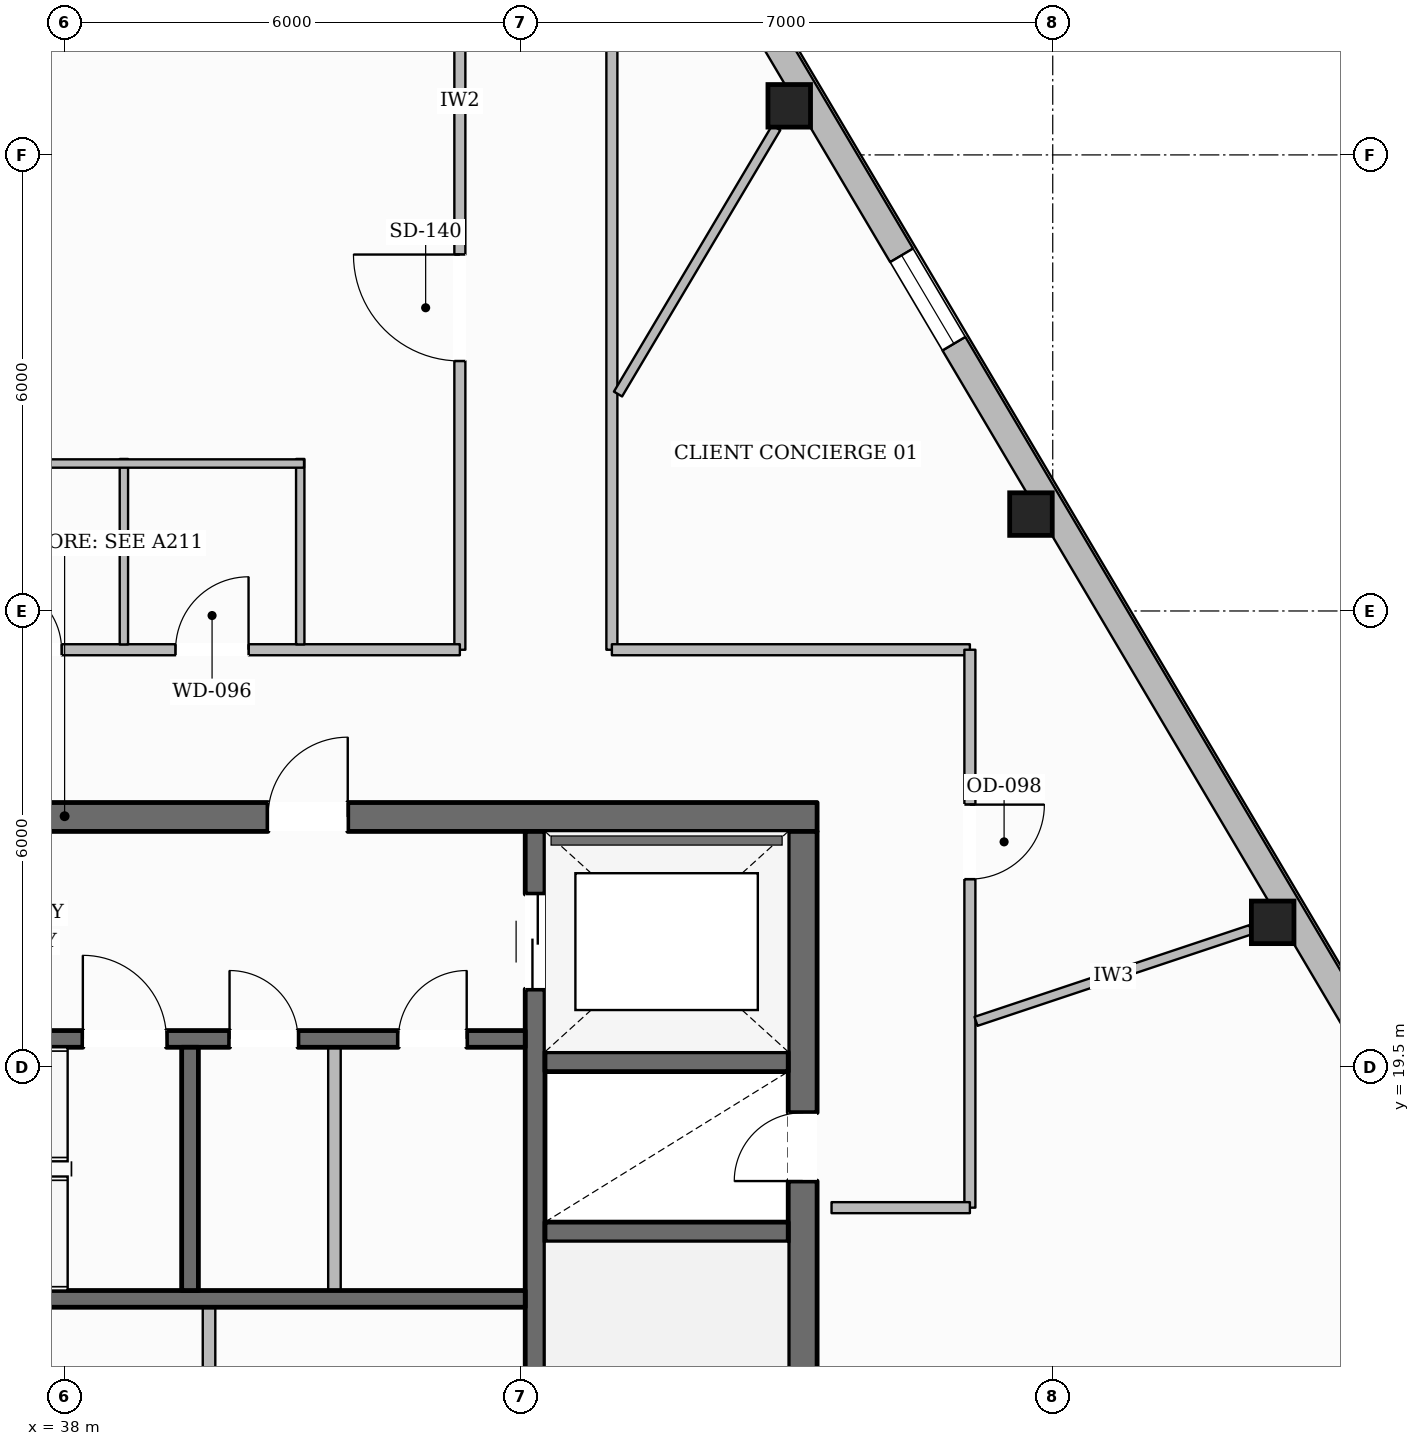
"""IFC4 building model, lengths in metres.
Left out: names, types, materials, properties, quantities, classifications, styles, units other than length and angle.
Written with IfcOpenShell. Run it as: python <this file> out.ifc"""

import sys

from ifc_helpers import new_model, si_unit, direction, frame, frame_2d, origin, origin_2d, place, context, subcontext, project, spatial, rectangle, hollow_rectangle, extrude, element, fill, save


model = new_model("IFC4")
c1 = context("Model", 3, precision=1e-05, world=origin(), true_north=direction((0.0, 1.0)))
c2 = subcontext(c1, "Body", "Model", "MODEL_VIEW")
j1 = project(units=[si_unit("LENGTHUNIT", "METRE"), si_unit("PLANEANGLEUNIT", "RADIAN")], contexts=[c1])
p1 = place(None, origin())
s1 = spatial("IfcSite", under=j1, at=p1, CompositionType="ELEMENT")
p2 = place(p1, origin())
s2 = spatial("IfcBuilding", under=s1, at=p2, CompositionType="ELEMENT")
p3 = place(p2, frame((0.0, 0.0, 266.45)))
s3 = spatial("IfcBuildingStorey", under=s2, at=p3, CompositionType="ELEMENT", Elevation=266.45)
p4 = place(p3, frame((28.1, 22.79, 0.0), z_axis=(0.0, 0.0, 1.0), x_axis=(1.0, 0.0, 0.0)))
e1 = element("IfcWall", 1, at=p4, inside=s3, PredefinedType="SOLIDWALL", context=c2, shape_type="SweptSolid", body=[
    extrude(rectangle(XDim=19.8, YDim=0.38, at=frame_2d((9.9, 0.0))), origin(), (0.0, 0.0, 1.0), 3.61),
])
p5 = place(p4, frame((6.175, 0.0, 0.0)))
e2 = element("IfcOpeningElement", 2, at=p5, cuts=e1, PredefinedType="OPENING", context=c2, shape_type="SweptSolid", body=[
    extrude(rectangle(XDim=1.05, YDim=2.15, at=frame_2d((0.525, 1.075))), frame((0.0, 0.2, 0.0), z_axis=(0.0, -1.0, 0.0), x_axis=(1.0, 0.0, 0.0)), (0.0, 0.0, 1.0), 0.4),
])
p6 = place(p4, frame((12.575, 0.0, 0.0)))
e3 = element("IfcOpeningElement", 3, at=p6, cuts=e1, PredefinedType="OPENING", context=c2, shape_type="SweptSolid", body=[
    extrude(rectangle(XDim=1.05, YDim=2.15, at=frame_2d((0.525, 1.075))), frame((0.0, 0.2, 0.0), z_axis=(0.0, -1.0, 0.0), x_axis=(1.0, 0.0, 0.0)), (0.0, 0.0, 1.0), 0.4),
])
p7 = place(p3, frame((47.71, 9.6, 0.0), z_axis=(0.0, 0.0, 1.0), x_axis=(0.0, 1.0, 0.0)))
e4 = element("IfcWall", 4, at=p7, inside=s3, PredefinedType="SOLIDWALL", context=c2, shape_type="SweptSolid", body=[
    extrude(rectangle(XDim=13.0, YDim=0.38, at=frame_2d((6.5, 0.0))), origin(), (0.0, 0.0, 1.0), 3.61),
])
p8 = place(p7, frame((0.2, 0.0, 0.0)))
e5 = element("IfcOpeningElement", 5, at=p8, cuts=e4, PredefinedType="OPENING", context=c2, shape_type="SweptSolid", body=[
    extrude(rectangle(XDim=1.1, YDim=2.15, at=frame_2d((0.55, 1.075))), frame((0.0, 0.2, 0.0), z_axis=(0.0, -1.0, 0.0), x_axis=(1.0, 0.0, 0.0)), (0.0, 0.0, 1.0), 0.4),
])
p9 = place(p7, frame((8.4, 0.0, 0.0)))
e6 = element("IfcOpeningElement", 6, at=p9, cuts=e4, PredefinedType="OPENING", context=c2, shape_type="SweptSolid", body=[
    extrude(rectangle(XDim=0.9, YDim=2.1, at=frame_2d((0.45, 1.05))), frame((0.0, 0.2, 0.0), z_axis=(0.0, -1.0, 0.0), x_axis=(1.0, 0.0, 0.0)), (0.0, 0.0, 1.0), 0.4),
])
p10 = place(p3, frame((44.19, 9.6, 0.0), z_axis=(0.0, 0.0, 1.0), x_axis=(0.0, 1.0, 0.0)))
e7 = element("IfcWall", 7, at=p10, inside=s3, PredefinedType="SHEAR", context=c2, shape_type="SweptSolid", body=[
    extrude(rectangle(XDim=13.0, YDim=0.26, at=frame_2d((6.5, 0.0))), origin(), (0.0, 0.0, 1.0), 3.61),
])
p11 = place(p10, frame((10.925, 0.0, 0.0)))
e8 = element("IfcOpeningElement", 8, at=p11, cuts=e7, PredefinedType="OPENING", context=c2, shape_type="SweptSolid", body=[
    extrude(rectangle(XDim=1.25, YDim=2.25, at=frame_2d((0.625, 1.125))), frame((0.0, 0.14, 0.0), z_axis=(0.0, -1.0, 0.0), x_axis=(1.0, 0.0, 0.0)), (0.0, 0.0, 1.0), 0.28),
])
for number, where, z_axis, x_axis in (
    (9, (44.32, 17.33, 0.0), (0.0, 0.0, 1.0), (1.0, 0.0, 0.0)),
    (10, (44.32, 19.57, 0.0), (0.0, 0.0, 1.0), (1.0, 0.0, 0.0)),
):
    element("IfcWall", number, at=place(p3, frame(where, z_axis=z_axis, x_axis=x_axis)), inside=s3, PredefinedType="SHEAR", context=c2, shape_type="SweptSolid", body=[
        extrude(rectangle(XDim=3.2, YDim=0.26, at=frame_2d((1.6, 0.0))), origin(), (0.0, 0.0, 1.0), 3.61),
    ])
p12 = place(p3, frame((31.94, 19.87, 0.0), z_axis=(0.0, 0.0, 1.0), x_axis=(1.0, 0.0, 0.0)))
e11 = element("IfcWall", 11, at=p12, inside=s3, PredefinedType="SOLIDWALL", context=c2, shape_type="SweptSolid", body=[
    extrude(rectangle(XDim=12.12, YDim=0.22, at=frame_2d((6.06, 0.0))), origin(), (0.0, 0.0, 1.0), 3.61),
])
p13 = place(p12, frame((6.3, 0.0, 0.0)))
e12 = element("IfcOpeningElement", 12, at=p13, cuts=e11, PredefinedType="OPENING", context=c2, shape_type="SweptSolid", body=[
    extrude(rectangle(XDim=1.1, YDim=2.15, at=frame_2d((0.55, 1.075))), frame((0.0, 0.12, 0.0), z_axis=(0.0, -1.0, 0.0), x_axis=(1.0, 0.0, 0.0)), (0.0, 0.0, 1.0), 0.24),
])
p14 = place(p12, frame((8.23, 0.0, 0.0)))
e13 = element("IfcOpeningElement", 13, at=p14, cuts=e11, PredefinedType="OPENING", context=c2, shape_type="SweptSolid", body=[
    extrude(rectangle(XDim=0.9, YDim=2.1, at=frame_2d((0.45, 1.05))), frame((0.0, 0.12, 0.0), z_axis=(0.0, -1.0, 0.0), x_axis=(1.0, 0.0, 0.0)), (0.0, 0.0, 1.0), 0.24),
])
p15 = place(p12, frame((10.45, 0.0, 0.0)))
e14 = element("IfcOpeningElement", 14, at=p15, cuts=e11, PredefinedType="OPENING", context=c2, shape_type="SweptSolid", body=[
    extrude(rectangle(XDim=0.9, YDim=2.1, at=frame_2d((0.45, 1.05))), frame((0.0, 0.12, 0.0), z_axis=(0.0, -1.0, 0.0), x_axis=(1.0, 0.0, 0.0)), (0.0, 0.0, 1.0), 0.24),
])
p16 = place(p3, frame((31.94, 16.45, 0.0), z_axis=(0.0, 0.0, 1.0), x_axis=(1.0, 0.0, 0.0)))
e15 = element("IfcWall", 15, at=p16, inside=s3, PredefinedType="SOLIDWALL", context=c2, shape_type="SweptSolid", body=[
    extrude(rectangle(XDim=12.12, YDim=0.22, at=frame_2d((6.06, 0.0))), origin(), (0.0, 0.0, 1.0), 3.61),
])
p17 = place(p3, frame((39.65, 16.56, 0.0), z_axis=(0.0, 0.0, 1.0), x_axis=(0.0, 1.0, 0.0)))
e16 = element("IfcWall", 16, at=p17, inside=s3, PredefinedType="SOLIDWALL", context=c2, shape_type="SweptSolid", body=[
    extrude(rectangle(XDim=3.2, YDim=0.22, at=frame_2d((1.6, 0.0))), origin(), (0.0, 0.0, 1.0), 3.61),
])
for number, where, z_axis, x_axis in (
    (17, (53.894, 21.404, 0.0), (0.0, 0.0, 1.0), (1.0, 0.0, 0.0)),
    (18, (50.713, 26.775, 0.0), (0.0, 0.0, 1.0), (1.0, 0.0, 0.0)),
    (19, (47.533, 32.146, 0.0), (0.0, 0.0, 1.0), (1.0, 0.0, 0.0)),
):
    element("IfcColumn", number, at=place(p3, frame(where, z_axis=z_axis, x_axis=x_axis)), inside=s3, PredefinedType="COLUMN", context=c2, shape_type="SweptSolid", body=[
        extrude(hollow_rectangle(XDim=0.56, YDim=0.56, WallThickness=0.025, at=origin_2d()), origin(), (0.0, 0.0, 1.0), 3.61),
    ])
p18 = place(p3, frame((41.166, 43.431, 0.0), z_axis=(0.0, 0.0, 1.0), x_axis=(0.50946847144, -0.860489323936, 0.0)))
e20 = element("IfcWall", 20, at=p18, inside=s3, PredefinedType="STANDARD", context=c2, shape_type="SweptSolid", body=[
    extrude(rectangle(XDim=38.404, YDim=0.35, at=frame_2d((19.202, 0.0))), origin(), (0.0, 0.0, 1.0), 3.196),
])
p19 = place(p18, frame((34.126, 0.0, 0.65)))
e21 = element("IfcOpeningElement", 21, at=p19, cuts=e20, PredefinedType="OPENING", context=c2, shape_type="SweptSolid", body=[
    extrude(rectangle(XDim=1.35, YDim=1.75, at=frame_2d((0.675, 0.875))), frame((0.0, 0.185, 0.0), z_axis=(0.0, -1.0, 0.0), x_axis=(1.0, 0.0, 0.0)), (0.0, 0.0, 1.0), 0.37),
])
p20 = place(p18, frame((27.884, 0.0, 0.65)))
e22 = element("IfcOpeningElement", 22, at=p20, cuts=e20, PredefinedType="OPENING", context=c2, shape_type="SweptSolid", body=[
    extrude(rectangle(XDim=1.35, YDim=1.75, at=frame_2d((0.675, 0.875))), frame((0.0, 0.185, 0.0), z_axis=(0.0, -1.0, 0.0), x_axis=(1.0, 0.0, 0.0)), (0.0, 0.0, 1.0), 0.37),
])
p21 = place(p18, frame((15.401, 0.0, 0.65)))
e23 = element("IfcOpeningElement", 23, at=p21, cuts=e20, PredefinedType="OPENING", context=c2, shape_type="SweptSolid", body=[
    extrude(rectangle(XDim=1.35, YDim=1.75, at=frame_2d((0.675, 0.875))), frame((0.0, 0.185, 0.0), z_axis=(0.0, -1.0, 0.0), x_axis=(1.0, 0.0, 0.0)), (0.0, 0.0, 1.0), 0.37),
])
p22 = place(p18, frame((9.159, 0.0, 0.65)))
e24 = element("IfcOpeningElement", 24, at=p22, cuts=e20, PredefinedType="OPENING", context=c2, shape_type="SweptSolid", body=[
    extrude(rectangle(XDim=1.35, YDim=1.75, at=frame_2d((0.675, 0.875))), frame((0.0, 0.185, 0.0), z_axis=(0.0, -1.0, 0.0), x_axis=(1.0, 0.0, 0.0)), (0.0, 0.0, 1.0), 0.37),
])
p23 = place(p18, frame((2.917, 0.0, 0.65)))
e25 = element("IfcOpeningElement", 25, at=p23, cuts=e20, PredefinedType="OPENING", context=c2, shape_type="SweptSolid", body=[
    extrude(rectangle(XDim=1.35, YDim=1.75, at=frame_2d((0.675, 0.875))), frame((0.0, 0.185, 0.0), z_axis=(0.0, -1.0, 0.0), x_axis=(1.0, 0.0, 0.0)), (0.0, 0.0, 1.0), 0.37),
])
p24 = place(p3, frame((39.9, 14.1, 0.0), z_axis=(0.0, 0.0, 1.0), x_axis=(0.0, 1.0, 0.0)))
e26 = element("IfcWall", 26, at=p24, inside=s3, PredefinedType="PARTITIONING", context=c2, shape_type="SweptSolid", body=[
    extrude(rectangle(XDim=2.24, YDim=0.165, at=frame_2d((1.12, 0.0))), origin(), (0.0, 0.0, 1.0), 3.61),
])
p25 = place(p3, frame((41.55, 16.56, 0.0), z_axis=(0.0, 0.0, 1.0), x_axis=(0.0, 1.0, 0.0)))
e27 = element("IfcWall", 27, at=p25, inside=s3, PredefinedType="PARTITIONING", context=c2, shape_type="SweptSolid", body=[
    extrude(rectangle(XDim=3.2, YDim=0.165, at=frame_2d((1.6, 0.0))), origin(), (0.0, 0.0, 1.0), 3.61),
])
p26 = place(p3, frame((43.2, 24.99, 0.0), z_axis=(0.0, 0.0, 1.0), x_axis=(0.0, 1.0, 0.0)))
e28 = element("IfcWall", 28, at=p26, inside=s3, PredefinedType="PARTITIONING", context=c2, shape_type="SweptSolid", body=[
    extrude(rectangle(XDim=8.999, YDim=0.145, at=frame_2d((4.499, 0.0))), origin(), (0.0, 0.0, 1.0), 3.61),
])
p27 = place(p26, frame((3.799, 0.0, 0.0)))
e29 = element("IfcOpeningElement", 29, at=p27, cuts=e28, PredefinedType="OPENING", context=c2, shape_type="SweptSolid", body=[
    extrude(rectangle(XDim=1.4, YDim=2.2, at=frame_2d((0.7, 1.1))), frame((0.0, 0.083, 0.0), z_axis=(0.0, -1.0, 0.0), x_axis=(1.0, 0.0, 0.0)), (0.0, 0.0, 1.0), 0.165),
])
p28 = place(p3, frame((45.2, 33.989, 0.0), z_axis=(0.0, 0.0, 1.0), x_axis=(0.0, -1.0, 0.0)))
e30 = element("IfcWall", 30, at=p28, inside=s3, PredefinedType="PARTITIONING", context=c2, shape_type="SweptSolid", body=[
    extrude(rectangle(XDim=8.999, YDim=0.145, at=frame_2d((4.499, 0.0))), origin(), (0.0, 0.0, 1.0), 3.61),
])
p29 = place(p3, frame((45.2, 24.99, 0.0), z_axis=(0.0, 0.0, 1.0), x_axis=(1.0, 0.0, 0.0)))
e31 = element("IfcWall", 31, at=p29, inside=s3, PredefinedType="PARTITIONING", context=c2, shape_type="SweptSolid", body=[
    extrude(rectangle(XDim=4.71, YDim=0.145, at=frame_2d((2.355, 0.0))), origin(), (0.0, 0.0, 1.0), 3.61),
])
p30 = place(p3, frame((49.91, 24.99, 0.0), z_axis=(0.0, 0.0, 1.0), x_axis=(0.0, -1.0, 0.0)))
e32 = element("IfcWall", 32, at=p30, inside=s3, PredefinedType="PARTITIONING", context=c2, shape_type="SweptSolid", body=[
    extrude(rectangle(XDim=7.34, YDim=0.145, at=frame_2d((3.67, 0.0))), origin(), (0.0, 0.0, 1.0), 3.349),
])
p31 = place(p30, frame((2.038, 0.0, 0.0)))
e33 = element("IfcOpeningElement", 33, at=p31, cuts=e32, PredefinedType="OPENING", context=c2, shape_type="SweptSolid", body=[
    extrude(rectangle(XDim=0.98, YDim=2.15, at=frame_2d((0.49, 1.075))), frame((0.0, 0.083, 0.0), z_axis=(0.0, -1.0, 0.0), x_axis=(1.0, 0.0, 0.0)), (0.0, 0.0, 1.0), 0.165),
])
p32 = place(p3, frame((49.91, 17.65, 0.0), z_axis=(0.0, 0.0, 1.0), x_axis=(-1.0, 0.0, 0.0)))
e34 = element("IfcWall", 34, at=p32, inside=s3, PredefinedType="PARTITIONING", context=c2, shape_type="SweptSolid", body=[
    extrude(rectangle(XDim=1.82, YDim=0.145, at=frame_2d((0.91, 0.0))), origin(), (0.0, 0.0, 1.0), 3.61),
])
p33 = place(p3, frame((26.09, 24.99, 0.0), z_axis=(0.0, 0.0, 1.0), x_axis=(1.0, 0.0, 0.0)))
e35 = element("IfcWall", 35, at=p33, inside=s3, PredefinedType="PARTITIONING", context=c2, shape_type="SweptSolid", body=[
    extrude(rectangle(XDim=17.11, YDim=0.145, at=frame_2d((8.555, 0.0))), origin(), (0.0, 0.0, 1.0), 3.61),
])
p34 = place(p33, frame((8.47, 0.0, 0.0)))
e36 = element("IfcOpeningElement", 36, at=p34, cuts=e35, PredefinedType="OPENING", context=c2, shape_type="SweptSolid", body=[
    extrude(rectangle(XDim=0.88, YDim=2.1, at=frame_2d((0.44, 1.05))), frame((0.0, 0.083, 0.0), z_axis=(0.0, -1.0, 0.0), x_axis=(1.0, 0.0, 0.0)), (0.0, 0.0, 1.0), 0.165),
])
p35 = place(p33, frame((10.99, 0.0, 0.0)))
e37 = element("IfcOpeningElement", 37, at=p35, cuts=e35, PredefinedType="OPENING", context=c2, shape_type="SweptSolid", body=[
    extrude(rectangle(XDim=0.88, YDim=2.1, at=frame_2d((0.44, 1.05))), frame((0.0, 0.083, 0.0), z_axis=(0.0, -1.0, 0.0), x_axis=(1.0, 0.0, 0.0)), (0.0, 0.0, 1.0), 0.165),
])
p36 = place(p33, frame((13.37, 0.0, 0.0)))
e38 = element("IfcOpeningElement", 38, at=p36, cuts=e35, PredefinedType="OPENING", context=c2, shape_type="SweptSolid", body=[
    extrude(rectangle(XDim=0.96, YDim=2.1, at=frame_2d((0.48, 1.05))), frame((0.0, 0.083, 0.0), z_axis=(0.0, -1.0, 0.0), x_axis=(1.0, 0.0, 0.0)), (0.0, 0.0, 1.0), 0.165),
])
p37 = place(p33, frame((4.253, 0.0, 0.0)))
e39 = element("IfcOpeningElement", 39, at=p37, cuts=e35, PredefinedType="OPENING", context=c2, shape_type="SweptSolid", body=[
    extrude(rectangle(XDim=0.98, YDim=2.15, at=frame_2d((0.49, 1.075))), frame((0.0, 0.083, 0.0), z_axis=(0.0, -1.0, 0.0), x_axis=(1.0, 0.0, 0.0)), (0.0, 0.0, 1.0), 0.165),
])
p38 = place(p3, frame((38.78, 25.06, 0.0), z_axis=(0.0, 0.0, 1.0), x_axis=(0.0, 1.0, 0.0)))
e40 = element("IfcWall", 40, at=p38, inside=s3, PredefinedType="PLUMBINGWALL", context=c2, shape_type="SweptSolid", body=[
    extrude(rectangle(XDim=2.44, YDim=0.11, at=frame_2d((1.22, 0.0))), origin(), (0.0, 0.0, 1.0), 3.61),
])
p39 = place(p3, frame((41.1, 25.06, 0.0), z_axis=(0.0, 0.0, 1.0), x_axis=(0.0, 1.0, 0.0)))
e41 = element("IfcWall", 41, at=p39, inside=s3, PredefinedType="PLUMBINGWALL", context=c2, shape_type="SweptSolid", body=[
    extrude(rectangle(XDim=2.44, YDim=0.11, at=frame_2d((1.22, 0.0))), origin(), (0.0, 0.0, 1.0), 3.246),
])
p40 = place(p3, frame((33.69, 27.44, 0.0), z_axis=(0.0, 0.0, 1.0), x_axis=(1.0, 0.0, 0.0)))
e42 = element("IfcWall", 42, at=p40, inside=s3, PredefinedType="PLUMBINGWALL", context=c2, shape_type="SweptSolid", body=[
    extrude(rectangle(XDim=7.46, YDim=0.11, at=frame_2d((3.73, 0.0))), origin(), (0.0, 0.0, 1.0), 3.61),
])
p41 = place(p3, frame((49.99, 20.101, 0.0), z_axis=(0.0, 0.0, 1.0), x_axis=(0.948580747424, 0.316535251774, 0.0)))
e43 = element("IfcWall", 43, at=p41, inside=s3, PredefinedType="PARTITIONING", context=c2, shape_type="SweptSolid", body=[
    extrude(rectangle(XDim=3.811, YDim=0.125, at=frame_2d((1.906, 0.0))), origin(), (0.0, 0.0, 1.0), 3.61),
])
p42 = place(p3, frame((45.281, 28.354, 0.0), z_axis=(0.0, 0.0, 1.0), x_axis=(0.510808625208, 0.859694450612, 0.0)))
e44 = element("IfcWall", 44, at=p42, inside=s3, PredefinedType="PARTITIONING", context=c2, shape_type="SweptSolid", body=[
    extrude(rectangle(XDim=4.075, YDim=0.125, at=frame_2d((2.038, 0.0))), origin(), (0.0, 0.0, 1.0), 3.61),
])
p43 = place(p21, origin())
e45 = element("IfcWindow", 45, at=p43, inside=s3, PartitioningType="SINGLE_PANEL", PredefinedType="WINDOW", context=c2, shape_type="SweptSolid", body=[
    extrude(rectangle(XDim=1.35, YDim=1.75, at=frame_2d((0.675, 0.875))), frame((0.0, 0.03, 0.0), z_axis=(0.0, -1.0, 0.0), x_axis=(1.0, 0.0, 0.0)), (0.0, 0.0, 1.0), 0.06),
])
fill(e23, e45)
p44 = place(p13, origin())
e46 = element("IfcDoor", 46, at=p44, inside=s3, OperationType="SINGLE_SWING_LEFT", PredefinedType="DOOR", context=c2, shape_type="SweptSolid", body=[
    extrude(rectangle(XDim=1.1, YDim=2.15, at=frame_2d((0.55, 1.075))), frame((0.0, 0.025, 0.0), z_axis=(0.0, -1.0, 0.0), x_axis=(1.0, 0.0, 0.0)), (0.0, 0.0, 1.0), 0.05),
])
fill(e12, e46)
p45 = place(p9, origin())
e47 = element("IfcDoor", 47, at=p45, inside=s3, OperationType="SINGLE_SWING_LEFT", PredefinedType="DOOR", context=c2, shape_type="SweptSolid", body=[
    extrude(rectangle(XDim=0.9, YDim=2.1, at=frame_2d((0.45, 1.05))), frame((0.0, 0.025, 0.0), z_axis=(0.0, -1.0, 0.0), x_axis=(1.0, 0.0, 0.0)), (0.0, 0.0, 1.0), 0.05),
])
fill(e6, e47)
p46 = place(p6, origin())
e48 = element("IfcDoor", 48, at=p46, inside=s3, OperationType="SINGLE_SWING_RIGHT", PredefinedType="DOOR", context=c2, shape_type="SweptSolid", body=[
    extrude(rectangle(XDim=1.05, YDim=2.15, at=frame_2d((0.525, 1.075))), frame((0.0, 0.025, 0.0), z_axis=(0.0, -1.0, 0.0), x_axis=(1.0, 0.0, 0.0)), (0.0, 0.0, 1.0), 0.05),
])
fill(e3, e48)
p47 = place(p11, origin())
e49 = element("IfcDoor", 49, at=p47, inside=s3, OperationType="DOUBLE_DOOR_SLIDING", PredefinedType="DOOR", context=c2, shape_type="SweptSolid", body=[
    extrude(rectangle(XDim=1.25, YDim=2.25, at=frame_2d((0.625, 1.125))), frame((0.0, 0.025, 0.0), z_axis=(0.0, -1.0, 0.0), x_axis=(1.0, 0.0, 0.0)), (0.0, 0.0, 1.0), 0.05),
])
fill(e8, e49)
p48 = place(p14, origin())
e50 = element("IfcDoor", 50, at=p48, inside=s3, OperationType="SINGLE_SWING_LEFT", PredefinedType="DOOR", context=c2, shape_type="SweptSolid", body=[
    extrude(rectangle(XDim=0.9, YDim=2.1, at=frame_2d((0.45, 1.05))), frame((0.0, 0.025, 0.0), z_axis=(0.0, -1.0, 0.0), x_axis=(1.0, 0.0, 0.0)), (0.0, 0.0, 1.0), 0.05),
])
fill(e13, e50)
p49 = place(p15, origin())
e51 = element("IfcDoor", 51, at=p49, inside=s3, OperationType="SINGLE_SWING_RIGHT", PredefinedType="DOOR", context=c2, shape_type="SweptSolid", body=[
    extrude(rectangle(XDim=0.9, YDim=2.1, at=frame_2d((0.45, 1.05))), frame((0.0, 0.025, 0.0), z_axis=(0.0, -1.0, 0.0), x_axis=(1.0, 0.0, 0.0)), (0.0, 0.0, 1.0), 0.05),
])
fill(e14, e51)
p50 = place(p35, origin())
e52 = element("IfcDoor", 52, at=p50, inside=s3, OperationType="SINGLE_SWING_LEFT", PredefinedType="DOOR", context=c2, shape_type="SweptSolid", body=[
    extrude(rectangle(XDim=0.88, YDim=2.1, at=frame_2d((0.44, 1.05))), frame((0.0, 0.025, 0.0), z_axis=(0.0, -1.0, 0.0), x_axis=(1.0, 0.0, 0.0)), (0.0, 0.0, 1.0), 0.05),
])
fill(e37, e52)
p51 = place(p36, origin())
e53 = element("IfcDoor", 53, at=p51, inside=s3, OperationType="SINGLE_SWING_RIGHT", PredefinedType="DOOR", context=c2, shape_type="SweptSolid", body=[
    extrude(rectangle(XDim=0.96, YDim=2.1, at=frame_2d((0.48, 1.05))), frame((0.0, 0.025, 0.0), z_axis=(0.0, -1.0, 0.0), x_axis=(1.0, 0.0, 0.0)), (0.0, 0.0, 1.0), 0.05),
])
fill(e38, e53)
p52 = place(p31, origin())
e54 = element("IfcDoor", 54, at=p52, inside=s3, OperationType="SINGLE_SWING_LEFT", PredefinedType="DOOR", context=c2, shape_type="SweptSolid", body=[
    extrude(rectangle(XDim=0.98, YDim=2.15, at=frame_2d((0.49, 1.075))), frame((0.0, 0.025, 0.0), z_axis=(0.0, -1.0, 0.0), x_axis=(1.0, 0.0, 0.0)), (0.0, 0.0, 1.0), 0.05),
])
fill(e33, e54)
p53 = place(p27, origin())
e55 = element("IfcDoor", 55, at=p53, inside=s3, OperationType="SINGLE_SWING_RIGHT", PredefinedType="DOOR", context=c2, shape_type="SweptSolid", body=[
    extrude(rectangle(XDim=1.4, YDim=2.2, at=frame_2d((0.7, 1.1))), frame((0.0, 0.025, 0.0), z_axis=(0.0, -1.0, 0.0), x_axis=(1.0, 0.0, 0.0)), (0.0, 0.0, 1.0), 0.05),
])
fill(e29, e55)
save(model, sys.argv[1])
